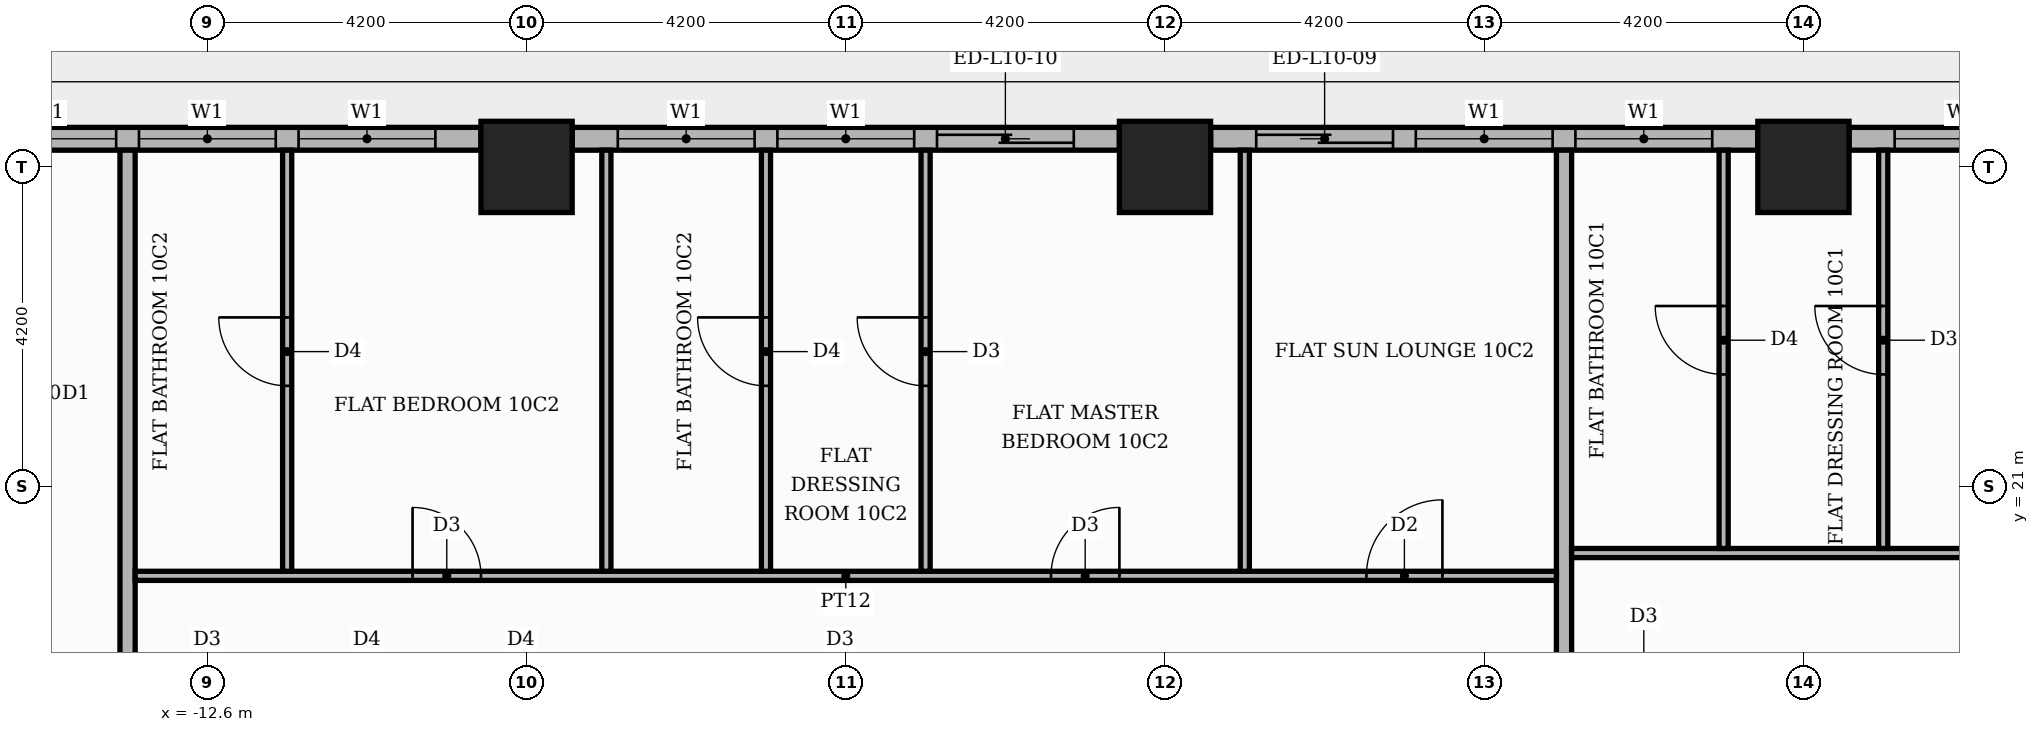
"""IFC4 building model, lengths in metres.
Left out: names, types, materials, properties, quantities, classifications, styles, units other than length and angle.
Written with IfcOpenShell. Run it as: python <this file> out.ifc"""

import sys

from ifc_helpers import new_model, si_unit, direction, frame, frame_2d, origin, origin_2d, place, context, subcontext, project, spatial, rectangle, extrude, element, fill, save


model = new_model("IFC4")
c1 = context("Model", 3, precision=1e-05, world=origin(), true_north=direction((0.0, 1.0)))
c2 = subcontext(c1, "Body", "Model", "MODEL_VIEW")
j1 = project(units=[si_unit("LENGTHUNIT", "METRE"), si_unit("PLANEANGLEUNIT", "RADIAN")], contexts=[c1])
p1 = place(None, origin())
s1 = spatial("IfcSite", under=j1, at=p1, CompositionType="ELEMENT")
p2 = place(p1, origin())
s2 = spatial("IfcBuilding", under=s1, at=p2, CompositionType="ELEMENT")
p3 = place(p2, frame((0.0, 0.0, 46.5)))
s3 = spatial("IfcBuildingStorey", under=s2, at=p3, CompositionType="ELEMENT", Elevation=46.5)
for number, where, z_axis, x_axis in (
    (1, (0.0, 25.2, 0.0), (0.0, 0.0, 1.0), (1.0, 0.0, 0.0)),
    (2, (-8.4, 25.2, 0.0), (0.0, 0.0, 1.0), (1.0, 0.0, 0.0)),
    (3, (8.4, 25.2, 0.0), (0.0, 0.0, 1.0), (1.0, 0.0, 0.0)),
):
    element("IfcColumn", number, at=place(p3, frame(where, z_axis=z_axis, x_axis=x_axis)), inside=s3, PredefinedType="COLUMN", context=c2, shape_type="SweptSolid", body=[
        extrude(rectangle(XDim=1.2, YDim=1.2, at=origin_2d()), origin(), (0.0, 0.0, 1.0), 3.9),
    ])
p4 = place(p3, frame((16.2, 25.57, 0.0), z_axis=(0.0, 0.0, 1.0), x_axis=(-1.0, 0.0, 0.0)))
e4 = element("IfcWall", 4, at=p4, inside=s3, PredefinedType="STANDARD", context=c2, shape_type="SweptSolid", body=[
    extrude(rectangle(XDim=7.2, YDim=0.3, at=frame_2d((3.6, 0.0))), origin(), (0.0, 0.0, 1.0), 3.48),
])
p5 = place(p4, frame((0.6, 0.0, 0.0)))
e5 = element("IfcOpeningElement", 5, at=p5, cuts=e4, PredefinedType="OPENING", context=c2, shape_type="SweptSolid", body=[
    extrude(rectangle(XDim=1.8, YDim=2.4, at=frame_2d((0.9, 1.2))), frame((0.0, 0.16, 0.0), z_axis=(0.0, -1.0, 0.0), x_axis=(1.0, 0.0, 0.0)), (0.0, 0.0, 1.0), 0.32),
])
p6 = place(p4, frame((2.7, 0.0, 0.0)))
e6 = element("IfcOpeningElement", 6, at=p6, cuts=e4, PredefinedType="OPENING", context=c2, shape_type="SweptSolid", body=[
    extrude(rectangle(XDim=1.8, YDim=2.4, at=frame_2d((0.9, 1.2))), frame((0.0, 0.16, 0.0), z_axis=(0.0, -1.0, 0.0), x_axis=(1.0, 0.0, 0.0)), (0.0, 0.0, 1.0), 0.32),
])
p7 = place(p4, frame((4.8, 0.0, 0.9)))
e7 = element("IfcOpeningElement", 7, at=p7, cuts=e4, PredefinedType="OPENING", context=c2, shape_type="SweptSolid", body=[
    extrude(rectangle(XDim=1.8, YDim=2.1, at=frame_2d((0.9, 1.05))), frame((0.0, 0.16, 0.0), z_axis=(0.0, -1.0, 0.0), x_axis=(1.0, 0.0, 0.0)), (0.0, 0.0, 1.0), 0.32),
])
p8 = place(p3, frame((7.8, 25.57, 0.0), z_axis=(0.0, 0.0, 1.0), x_axis=(-1.0, 0.0, 0.0)))
e8 = element("IfcWall", 8, at=p8, inside=s3, PredefinedType="STANDARD", context=c2, shape_type="SweptSolid", body=[
    extrude(rectangle(XDim=7.2, YDim=0.3, at=frame_2d((3.6, 0.0))), origin(), (0.0, 0.0, 1.0), 3.48),
])
p9 = place(p8, frame((0.6, 0.0, 0.9)))
e9 = element("IfcOpeningElement", 9, at=p9, cuts=e8, PredefinedType="OPENING", context=c2, shape_type="SweptSolid", body=[
    extrude(rectangle(XDim=1.8, YDim=2.1, at=frame_2d((0.9, 1.05))), frame((0.0, 0.16, 0.0), z_axis=(0.0, -1.0, 0.0), x_axis=(1.0, 0.0, 0.0)), (0.0, 0.0, 1.0), 0.32),
])
p10 = place(p8, frame((2.7, 0.0, 0.9)))
e10 = element("IfcOpeningElement", 10, at=p10, cuts=e8, PredefinedType="OPENING", context=c2, shape_type="SweptSolid", body=[
    extrude(rectangle(XDim=1.8, YDim=2.1, at=frame_2d((0.9, 1.05))), frame((0.0, 0.16, 0.0), z_axis=(0.0, -1.0, 0.0), x_axis=(1.0, 0.0, 0.0)), (0.0, 0.0, 1.0), 0.32),
])
p11 = place(p8, frame((4.8, 0.0, 0.0)))
e11 = element("IfcOpeningElement", 11, at=p11, cuts=e8, PredefinedType="OPENING", context=c2, shape_type="SweptSolid", body=[
    extrude(rectangle(XDim=1.8, YDim=2.4, at=frame_2d((0.9, 1.2))), frame((0.0, 0.16, 0.0), z_axis=(0.0, -1.0, 0.0), x_axis=(1.0, 0.0, 0.0)), (0.0, 0.0, 1.0), 0.32),
])
p12 = place(p3, frame((-0.6, 25.57, 0.0), z_axis=(0.0, 0.0, 1.0), x_axis=(-1.0, 0.0, 0.0)))
e12 = element("IfcWall", 12, at=p12, inside=s3, PredefinedType="STANDARD", context=c2, shape_type="SweptSolid", body=[
    extrude(rectangle(XDim=7.2, YDim=0.3, at=frame_2d((3.6, 0.0))), origin(), (0.0, 0.0, 1.0), 3.48),
])
p13 = place(p12, frame((0.6, 0.0, 0.0)))
e13 = element("IfcOpeningElement", 13, at=p13, cuts=e12, PredefinedType="OPENING", context=c2, shape_type="SweptSolid", body=[
    extrude(rectangle(XDim=1.8, YDim=2.4, at=frame_2d((0.9, 1.2))), frame((0.0, 0.16, 0.0), z_axis=(0.0, -1.0, 0.0), x_axis=(1.0, 0.0, 0.0)), (0.0, 0.0, 1.0), 0.32),
])
p14 = place(p12, frame((2.7, 0.0, 0.9)))
e14 = element("IfcOpeningElement", 14, at=p14, cuts=e12, PredefinedType="OPENING", context=c2, shape_type="SweptSolid", body=[
    extrude(rectangle(XDim=1.8, YDim=2.1, at=frame_2d((0.9, 1.05))), frame((0.0, 0.16, 0.0), z_axis=(0.0, -1.0, 0.0), x_axis=(1.0, 0.0, 0.0)), (0.0, 0.0, 1.0), 0.32),
])
p15 = place(p12, frame((4.8, 0.0, 0.9)))
e15 = element("IfcOpeningElement", 15, at=p15, cuts=e12, PredefinedType="OPENING", context=c2, shape_type="SweptSolid", body=[
    extrude(rectangle(XDim=1.8, YDim=2.1, at=frame_2d((0.9, 1.05))), frame((0.0, 0.16, 0.0), z_axis=(0.0, -1.0, 0.0), x_axis=(1.0, 0.0, 0.0)), (0.0, 0.0, 1.0), 0.32),
])
p16 = place(p3, frame((-9.0, 25.57, 0.0), z_axis=(0.0, 0.0, 1.0), x_axis=(-1.0, 0.0, 0.0)))
e16 = element("IfcWall", 16, at=p16, inside=s3, PredefinedType="STANDARD", context=c2, shape_type="SweptSolid", body=[
    extrude(rectangle(XDim=7.2, YDim=0.3, at=frame_2d((3.6, 0.0))), origin(), (0.0, 0.0, 1.0), 3.48),
])
p17 = place(p16, frame((0.6, 0.0, 0.9)))
e17 = element("IfcOpeningElement", 17, at=p17, cuts=e16, PredefinedType="OPENING", context=c2, shape_type="SweptSolid", body=[
    extrude(rectangle(XDim=1.8, YDim=2.1, at=frame_2d((0.9, 1.05))), frame((0.0, 0.16, 0.0), z_axis=(0.0, -1.0, 0.0), x_axis=(1.0, 0.0, 0.0)), (0.0, 0.0, 1.0), 0.32),
])
p18 = place(p16, frame((2.7, 0.0, 0.9)))
e18 = element("IfcOpeningElement", 18, at=p18, cuts=e16, PredefinedType="OPENING", context=c2, shape_type="SweptSolid", body=[
    extrude(rectangle(XDim=1.8, YDim=2.1, at=frame_2d((0.9, 1.05))), frame((0.0, 0.16, 0.0), z_axis=(0.0, -1.0, 0.0), x_axis=(1.0, 0.0, 0.0)), (0.0, 0.0, 1.0), 0.32),
])
p19 = place(p16, frame((4.8, 0.0, 0.9)))
e19 = element("IfcOpeningElement", 19, at=p19, cuts=e16, PredefinedType="OPENING", context=c2, shape_type="SweptSolid", body=[
    extrude(rectangle(XDim=1.8, YDim=2.1, at=frame_2d((0.9, 1.05))), frame((0.0, 0.16, 0.0), z_axis=(0.0, -1.0, 0.0), x_axis=(1.0, 0.0, 0.0)), (0.0, 0.0, 1.0), 0.32),
])
for number, where, z_axis, x_axis in (
    (20, (-13.65, 13.75, 0.0), (0.0, 0.0, 1.0), (0.0, 1.0, 0.0)),
    (21, (5.25, 13.75, 0.0), (0.0, 0.0, 1.0), (0.0, 1.0, 0.0)),
):
    element("IfcWall", number, at=place(p3, frame(where, z_axis=z_axis, x_axis=x_axis)), inside=s3, PredefinedType="PARTITIONING", context=c2, shape_type="SweptSolid", body=[
        extrude(rectangle(XDim=11.67, YDim=0.2, at=frame_2d((5.835, 0.0))), origin(), (0.0, 0.0, 1.0), 3.48),
    ])
p20 = place(p3, frame((-13.55, 19.82, 0.0), z_axis=(0.0, 0.0, 1.0), x_axis=(1.0, 0.0, 0.0)))
e22 = element("IfcWall", 22, at=p20, inside=s3, PredefinedType="PARTITIONING", context=c2, shape_type="SweptSolid", body=[
    extrude(rectangle(XDim=18.7, YDim=0.12, at=frame_2d((9.35, 0.0))), origin(), (0.0, 0.0, 1.0), 3.48),
])
p21 = place(p20, frame((16.2, 0.0, 0.0)))
e23 = element("IfcOpeningElement", 23, at=p21, cuts=e22, PredefinedType="OPENING", context=c2, shape_type="SweptSolid", body=[
    extrude(rectangle(XDim=1.0, YDim=2.1, at=frame_2d((0.5, 1.05))), frame((0.0, 0.07, 0.0), z_axis=(0.0, -1.0, 0.0), x_axis=(1.0, 0.0, 0.0)), (0.0, 0.0, 1.0), 0.14),
])
p22 = place(p20, frame((12.05, 0.0, 0.0)))
e24 = element("IfcOpeningElement", 24, at=p22, cuts=e22, PredefinedType="OPENING", context=c2, shape_type="SweptSolid", body=[
    extrude(rectangle(XDim=0.9, YDim=2.1, at=frame_2d((0.45, 1.05))), frame((0.0, 0.07, 0.0), z_axis=(0.0, -1.0, 0.0), x_axis=(1.0, 0.0, 0.0)), (0.0, 0.0, 1.0), 0.14),
])
p23 = place(p20, frame((3.65, 0.0, 0.0)))
e25 = element("IfcOpeningElement", 25, at=p23, cuts=e22, PredefinedType="OPENING", context=c2, shape_type="SweptSolid", body=[
    extrude(rectangle(XDim=0.9, YDim=2.1, at=frame_2d((0.45, 1.05))), frame((0.0, 0.07, 0.0), z_axis=(0.0, -1.0, 0.0), x_axis=(1.0, 0.0, 0.0)), (0.0, 0.0, 1.0), 0.14),
])
p24 = place(p3, frame((-11.55, 19.88, 0.0), z_axis=(0.0, 0.0, 1.0), x_axis=(0.0, 1.0, 0.0)))
e26 = element("IfcWall", 26, at=p24, inside=s3, PredefinedType="PARTITIONING", context=c2, shape_type="SweptSolid", body=[
    extrude(rectangle(XDim=5.54, YDim=0.12, at=frame_2d((2.77, 0.0))), origin(), (0.0, 0.0, 1.0), 3.48),
])
p25 = place(p24, frame((2.44, 0.0, 0.0)))
e27 = element("IfcOpeningElement", 27, at=p25, cuts=e26, PredefinedType="OPENING", context=c2, shape_type="SweptSolid", body=[
    extrude(rectangle(XDim=0.9, YDim=2.1, at=frame_2d((0.45, 1.05))), frame((0.0, 0.07, 0.0), z_axis=(0.0, -1.0, 0.0), x_axis=(1.0, 0.0, 0.0)), (0.0, 0.0, 1.0), 0.14),
])
p26 = place(p3, frame((-7.35, 19.88, 0.0), z_axis=(0.0, 0.0, 1.0), x_axis=(0.0, 1.0, 0.0)))
e28 = element("IfcWall", 28, at=p26, inside=s3, PredefinedType="PARTITIONING", context=c2, shape_type="SweptSolid", body=[
    extrude(rectangle(XDim=5.54, YDim=0.12, at=frame_2d((2.77, 0.0))), origin(), (0.0, 0.0, 1.0), 3.48),
])
p27 = place(p3, frame((-5.25, 19.88, 0.0), z_axis=(0.0, 0.0, 1.0), x_axis=(0.0, 1.0, 0.0)))
e29 = element("IfcWall", 29, at=p27, inside=s3, PredefinedType="PARTITIONING", context=c2, shape_type="SweptSolid", body=[
    extrude(rectangle(XDim=5.54, YDim=0.12, at=frame_2d((2.77, 0.0))), origin(), (0.0, 0.0, 1.0), 3.48),
])
p28 = place(p27, frame((2.44, 0.0, 0.0)))
e30 = element("IfcOpeningElement", 30, at=p28, cuts=e29, PredefinedType="OPENING", context=c2, shape_type="SweptSolid", body=[
    extrude(rectangle(XDim=0.9, YDim=2.1, at=frame_2d((0.45, 1.05))), frame((0.0, 0.07, 0.0), z_axis=(0.0, -1.0, 0.0), x_axis=(1.0, 0.0, 0.0)), (0.0, 0.0, 1.0), 0.14),
])
p29 = place(p3, frame((-3.15, 19.88, 0.0), z_axis=(0.0, 0.0, 1.0), x_axis=(0.0, 1.0, 0.0)))
e31 = element("IfcWall", 31, at=p29, inside=s3, PredefinedType="PARTITIONING", context=c2, shape_type="SweptSolid", body=[
    extrude(rectangle(XDim=5.54, YDim=0.12, at=frame_2d((2.77, 0.0))), origin(), (0.0, 0.0, 1.0), 3.48),
])
p30 = place(p29, frame((2.44, 0.0, 0.0)))
e32 = element("IfcOpeningElement", 32, at=p30, cuts=e31, PredefinedType="OPENING", context=c2, shape_type="SweptSolid", body=[
    extrude(rectangle(XDim=0.9, YDim=2.1, at=frame_2d((0.45, 1.05))), frame((0.0, 0.07, 0.0), z_axis=(0.0, -1.0, 0.0), x_axis=(1.0, 0.0, 0.0)), (0.0, 0.0, 1.0), 0.14),
])
p31 = place(p3, frame((1.05, 19.88, 0.0), z_axis=(0.0, 0.0, 1.0), x_axis=(0.0, 1.0, 0.0)))
e33 = element("IfcWall", 33, at=p31, inside=s3, PredefinedType="PARTITIONING", context=c2, shape_type="SweptSolid", body=[
    extrude(rectangle(XDim=5.54, YDim=0.12, at=frame_2d((2.77, 0.0))), origin(), (0.0, 0.0, 1.0), 3.48),
])
p32 = place(p3, frame((5.35, 20.12, 0.0), z_axis=(0.0, 0.0, 1.0), x_axis=(1.0, 0.0, 0.0)))
e34 = element("IfcWall", 34, at=p32, inside=s3, PredefinedType="PARTITIONING", context=c2, shape_type="SweptSolid", body=[
    extrude(rectangle(XDim=11.95, YDim=0.12, at=frame_2d((5.975, 0.0))), origin(), (0.0, 0.0, 1.0), 3.48),
])
p33 = place(p32, frame((8.85, 0.0, 0.0)))
e35 = element("IfcOpeningElement", 35, at=p33, cuts=e34, PredefinedType="OPENING", context=c2, shape_type="SweptSolid", body=[
    extrude(rectangle(XDim=1.0, YDim=2.1, at=frame_2d((0.5, 1.05))), frame((0.0, 0.07, 0.0), z_axis=(0.0, -1.0, 0.0), x_axis=(1.0, 0.0, 0.0)), (0.0, 0.0, 1.0), 0.14),
])
p34 = place(p32, frame((5.75, 0.0, 0.0)))
e36 = element("IfcOpeningElement", 36, at=p34, cuts=e34, PredefinedType="OPENING", context=c2, shape_type="SweptSolid", body=[
    extrude(rectangle(XDim=0.9, YDim=2.1, at=frame_2d((0.45, 1.05))), frame((0.0, 0.07, 0.0), z_axis=(0.0, -1.0, 0.0), x_axis=(1.0, 0.0, 0.0)), (0.0, 0.0, 1.0), 0.14),
])
p35 = place(p3, frame((7.35, 20.18, 0.0), z_axis=(0.0, 0.0, 1.0), x_axis=(0.0, 1.0, 0.0)))
e37 = element("IfcWall", 37, at=p35, inside=s3, PredefinedType="PARTITIONING", context=c2, shape_type="SweptSolid", body=[
    extrude(rectangle(XDim=5.24, YDim=0.12, at=frame_2d((2.62, 0.0))), origin(), (0.0, 0.0, 1.0), 3.48),
])
p36 = place(p35, frame((2.29, 0.0, 0.0)))
e38 = element("IfcOpeningElement", 38, at=p36, cuts=e37, PredefinedType="OPENING", context=c2, shape_type="SweptSolid", body=[
    extrude(rectangle(XDim=0.9, YDim=2.1, at=frame_2d((0.45, 1.05))), frame((0.0, 0.07, 0.0), z_axis=(0.0, -1.0, 0.0), x_axis=(1.0, 0.0, 0.0)), (0.0, 0.0, 1.0), 0.14),
])
p37 = place(p3, frame((9.45, 20.18, 0.0), z_axis=(0.0, 0.0, 1.0), x_axis=(0.0, 1.0, 0.0)))
e39 = element("IfcWall", 39, at=p37, inside=s3, PredefinedType="PARTITIONING", context=c2, shape_type="SweptSolid", body=[
    extrude(rectangle(XDim=5.24, YDim=0.12, at=frame_2d((2.62, 0.0))), origin(), (0.0, 0.0, 1.0), 3.48),
])
p38 = place(p37, frame((2.29, 0.0, 0.0)))
e40 = element("IfcOpeningElement", 40, at=p38, cuts=e39, PredefinedType="OPENING", context=c2, shape_type="SweptSolid", body=[
    extrude(rectangle(XDim=0.9, YDim=2.1, at=frame_2d((0.45, 1.05))), frame((0.0, 0.07, 0.0), z_axis=(0.0, -1.0, 0.0), x_axis=(1.0, 0.0, 0.0)), (0.0, 0.0, 1.0), 0.14),
])
p39 = place(p7, origin())
e41 = element("IfcWindow", 41, at=p39, inside=s3, PartitioningType="SINGLE_PANEL", PredefinedType="WINDOW", context=c2, shape_type="SweptSolid", body=[
    extrude(rectangle(XDim=1.8, YDim=2.1, at=frame_2d((0.9, 1.05))), frame((0.0, 0.03, 0.0), z_axis=(0.0, -1.0, 0.0), x_axis=(1.0, 0.0, 0.0)), (0.0, 0.0, 1.0), 0.06),
])
fill(e7, e41)
p40 = place(p9, origin())
e42 = element("IfcWindow", 42, at=p40, inside=s3, PartitioningType="SINGLE_PANEL", PredefinedType="WINDOW", context=c2, shape_type="SweptSolid", body=[
    extrude(rectangle(XDim=1.8, YDim=2.1, at=frame_2d((0.9, 1.05))), frame((0.0, 0.03, 0.0), z_axis=(0.0, -1.0, 0.0), x_axis=(1.0, 0.0, 0.0)), (0.0, 0.0, 1.0), 0.06),
])
fill(e9, e42)
p41 = place(p10, origin())
e43 = element("IfcWindow", 43, at=p41, inside=s3, PartitioningType="SINGLE_PANEL", PredefinedType="WINDOW", context=c2, shape_type="SweptSolid", body=[
    extrude(rectangle(XDim=1.8, YDim=2.1, at=frame_2d((0.9, 1.05))), frame((0.0, 0.03, 0.0), z_axis=(0.0, -1.0, 0.0), x_axis=(1.0, 0.0, 0.0)), (0.0, 0.0, 1.0), 0.06),
])
fill(e10, e43)
p42 = place(p11, origin())
e44 = element("IfcDoor", 44, at=p42, inside=s3, OperationType="SLIDING_TO_RIGHT", PredefinedType="DOOR", context=c2, shape_type="SweptSolid", body=[
    extrude(rectangle(XDim=1.8, YDim=2.4, at=frame_2d((0.9, 1.2))), frame((0.0, 0.025, 0.0), z_axis=(0.0, -1.0, 0.0), x_axis=(1.0, 0.0, 0.0)), (0.0, 0.0, 1.0), 0.05),
])
fill(e11, e44)
p43 = place(p13, origin())
e45 = element("IfcDoor", 45, at=p43, inside=s3, OperationType="SLIDING_TO_LEFT", PredefinedType="DOOR", context=c2, shape_type="SweptSolid", body=[
    extrude(rectangle(XDim=1.8, YDim=2.4, at=frame_2d((0.9, 1.2))), frame((0.0, 0.025, 0.0), z_axis=(0.0, -1.0, 0.0), x_axis=(1.0, 0.0, 0.0)), (0.0, 0.0, 1.0), 0.05),
])
fill(e13, e45)
p44 = place(p14, origin())
e46 = element("IfcWindow", 46, at=p44, inside=s3, PartitioningType="SINGLE_PANEL", PredefinedType="WINDOW", context=c2, shape_type="SweptSolid", body=[
    extrude(rectangle(XDim=1.8, YDim=2.1, at=frame_2d((0.9, 1.05))), frame((0.0, 0.03, 0.0), z_axis=(0.0, -1.0, 0.0), x_axis=(1.0, 0.0, 0.0)), (0.0, 0.0, 1.0), 0.06),
])
fill(e14, e46)
p45 = place(p15, origin())
e47 = element("IfcWindow", 47, at=p45, inside=s3, PartitioningType="SINGLE_PANEL", PredefinedType="WINDOW", context=c2, shape_type="SweptSolid", body=[
    extrude(rectangle(XDim=1.8, YDim=2.1, at=frame_2d((0.9, 1.05))), frame((0.0, 0.03, 0.0), z_axis=(0.0, -1.0, 0.0), x_axis=(1.0, 0.0, 0.0)), (0.0, 0.0, 1.0), 0.06),
])
fill(e15, e47)
p46 = place(p17, origin())
e48 = element("IfcWindow", 48, at=p46, inside=s3, PartitioningType="SINGLE_PANEL", PredefinedType="WINDOW", context=c2, shape_type="SweptSolid", body=[
    extrude(rectangle(XDim=1.8, YDim=2.1, at=frame_2d((0.9, 1.05))), frame((0.0, 0.03, 0.0), z_axis=(0.0, -1.0, 0.0), x_axis=(1.0, 0.0, 0.0)), (0.0, 0.0, 1.0), 0.06),
])
fill(e17, e48)
p47 = place(p18, origin())
e49 = element("IfcWindow", 49, at=p47, inside=s3, PartitioningType="SINGLE_PANEL", PredefinedType="WINDOW", context=c2, shape_type="SweptSolid", body=[
    extrude(rectangle(XDim=1.8, YDim=2.1, at=frame_2d((0.9, 1.05))), frame((0.0, 0.03, 0.0), z_axis=(0.0, -1.0, 0.0), x_axis=(1.0, 0.0, 0.0)), (0.0, 0.0, 1.0), 0.06),
])
fill(e18, e49)
p48 = place(p19, origin())
e50 = element("IfcWindow", 50, at=p48, inside=s3, PartitioningType="SINGLE_PANEL", PredefinedType="WINDOW", context=c2, shape_type="SweptSolid", body=[
    extrude(rectangle(XDim=1.8, YDim=2.1, at=frame_2d((0.9, 1.05))), frame((0.0, 0.03, 0.0), z_axis=(0.0, -1.0, 0.0), x_axis=(1.0, 0.0, 0.0)), (0.0, 0.0, 1.0), 0.06),
])
fill(e19, e50)
p49 = place(p38, origin())
e51 = element("IfcDoor", 51, at=p49, inside=s3, OperationType="SINGLE_SWING_RIGHT", PredefinedType="DOOR", context=c2, shape_type="SweptSolid", body=[
    extrude(rectangle(XDim=0.9, YDim=2.1, at=frame_2d((0.45, 1.05))), frame((0.0, 0.025, 0.0), z_axis=(0.0, -1.0, 0.0), x_axis=(1.0, 0.0, 0.0)), (0.0, 0.0, 1.0), 0.05),
])
fill(e40, e51)
p50 = place(p36, origin())
e52 = element("IfcDoor", 52, at=p50, inside=s3, OperationType="SINGLE_SWING_RIGHT", PredefinedType="DOOR", context=c2, shape_type="SweptSolid", body=[
    extrude(rectangle(XDim=0.9, YDim=2.1, at=frame_2d((0.45, 1.05))), frame((0.0, 0.025, 0.0), z_axis=(0.0, -1.0, 0.0), x_axis=(1.0, 0.0, 0.0)), (0.0, 0.0, 1.0), 0.05),
])
fill(e38, e52)
p51 = place(p21, origin())
e53 = element("IfcDoor", 53, at=p51, inside=s3, OperationType="SINGLE_SWING_RIGHT", PredefinedType="DOOR", context=c2, shape_type="SweptSolid", body=[
    extrude(rectangle(XDim=1.0, YDim=2.1, at=frame_2d((0.5, 1.05))), frame((0.0, 0.025, 0.0), z_axis=(0.0, -1.0, 0.0), x_axis=(1.0, 0.0, 0.0)), (0.0, 0.0, 1.0), 0.05),
])
fill(e23, e53)
p52 = place(p22, origin())
e54 = element("IfcDoor", 54, at=p52, inside=s3, OperationType="SINGLE_SWING_RIGHT", PredefinedType="DOOR", context=c2, shape_type="SweptSolid", body=[
    extrude(rectangle(XDim=0.9, YDim=2.1, at=frame_2d((0.45, 1.05))), frame((0.0, 0.025, 0.0), z_axis=(0.0, -1.0, 0.0), x_axis=(1.0, 0.0, 0.0)), (0.0, 0.0, 1.0), 0.05),
])
fill(e24, e54)
p53 = place(p30, origin())
e55 = element("IfcDoor", 55, at=p53, inside=s3, OperationType="SINGLE_SWING_RIGHT", PredefinedType="DOOR", context=c2, shape_type="SweptSolid", body=[
    extrude(rectangle(XDim=0.9, YDim=2.1, at=frame_2d((0.45, 1.05))), frame((0.0, 0.025, 0.0), z_axis=(0.0, -1.0, 0.0), x_axis=(1.0, 0.0, 0.0)), (0.0, 0.0, 1.0), 0.05),
])
fill(e32, e55)
p54 = place(p28, origin())
e56 = element("IfcDoor", 56, at=p54, inside=s3, OperationType="SINGLE_SWING_RIGHT", PredefinedType="DOOR", context=c2, shape_type="SweptSolid", body=[
    extrude(rectangle(XDim=0.9, YDim=2.1, at=frame_2d((0.45, 1.05))), frame((0.0, 0.025, 0.0), z_axis=(0.0, -1.0, 0.0), x_axis=(1.0, 0.0, 0.0)), (0.0, 0.0, 1.0), 0.05),
])
fill(e30, e56)
p55 = place(p23, origin())
e57 = element("IfcDoor", 57, at=p55, inside=s3, OperationType="SINGLE_SWING_LEFT", PredefinedType="DOOR", context=c2, shape_type="SweptSolid", body=[
    extrude(rectangle(XDim=0.9, YDim=2.1, at=frame_2d((0.45, 1.05))), frame((0.0, 0.025, 0.0), z_axis=(0.0, -1.0, 0.0), x_axis=(1.0, 0.0, 0.0)), (0.0, 0.0, 1.0), 0.05),
])
fill(e25, e57)
p56 = place(p25, origin())
e58 = element("IfcDoor", 58, at=p56, inside=s3, OperationType="SINGLE_SWING_RIGHT", PredefinedType="DOOR", context=c2, shape_type="SweptSolid", body=[
    extrude(rectangle(XDim=0.9, YDim=2.1, at=frame_2d((0.45, 1.05))), frame((0.0, 0.025, 0.0), z_axis=(0.0, -1.0, 0.0), x_axis=(1.0, 0.0, 0.0)), (0.0, 0.0, 1.0), 0.05),
])
fill(e27, e58)
save(model, sys.argv[1])
